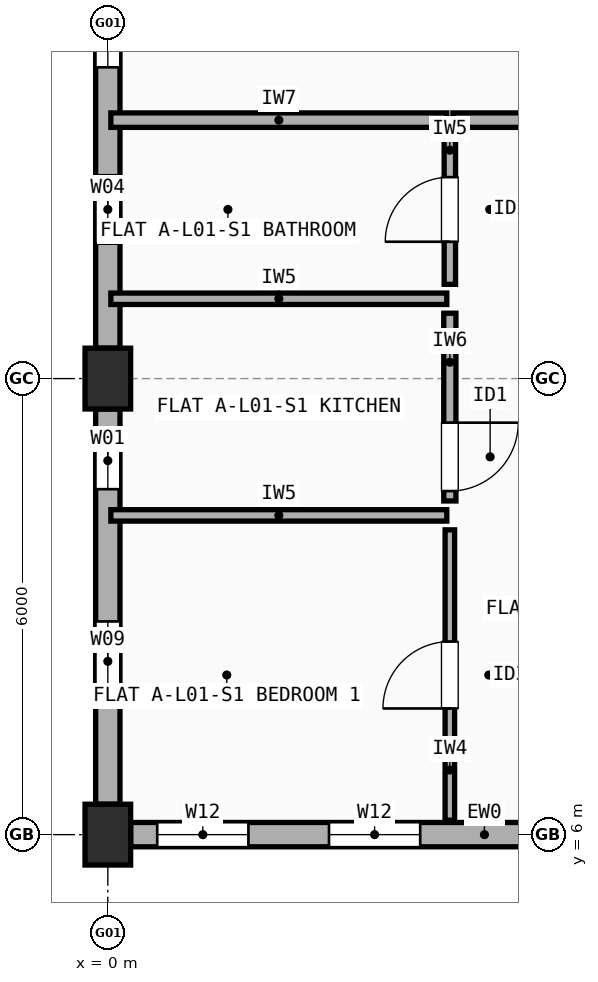
"""IFC4 building model, lengths in metres.
Left out: names, types, materials, properties, quantities, classifications, styles, units other than length and angle.
Written with IfcOpenShell. Run it as: python <this file> out.ifc"""

import sys

from ifc_helpers import new_model, si_unit, direction, frame, frame_2d, origin, origin_2d, place, context, subcontext, project, spatial, rectangle, extrude, element, fill, save


model = new_model("IFC4")
c1 = context("Model", 3, precision=1e-05, world=origin(), true_north=direction((0.0, 1.0)))
c2 = subcontext(c1, "Body", "Model", "MODEL_VIEW")
j1 = project(units=[si_unit("LENGTHUNIT", "METRE"), si_unit("PLANEANGLEUNIT", "RADIAN")], contexts=[c1])
p1 = place(None, origin())
s1 = spatial("IfcSite", under=j1, at=p1, CompositionType="ELEMENT")
p2 = place(p1, origin())
s2 = spatial("IfcBuilding", under=s1, at=p2, CompositionType="ELEMENT")
p3 = place(p2, frame((0.0, 0.0, 4.5)))
s3 = spatial("IfcBuildingStorey", under=s2, at=p3, CompositionType="ELEMENT", Elevation=4.5)
for number, where, z_axis, x_axis in (
    (1, (0.0, 6.0, 0.0), (0.0, 0.0, 1.0), (1.0, 0.0, 0.0)),
    (2, (0.0, 12.0, 0.0), (0.0, 0.0, 1.0), (1.0, 0.0, 0.0)),
):
    element("IfcColumn", number, at=place(p3, frame(where, z_axis=z_axis, x_axis=x_axis)), inside=s3, PredefinedType="COLUMN", context=c2, shape_type="SweptSolid", body=[
        extrude(rectangle(XDim=0.6, YDim=0.8, at=origin_2d()), origin(), (0.0, 0.0, 1.0), 2.945),
    ])
p4 = place(p3, frame((0.3, 6.0, 0.0), z_axis=(0.0, 0.0, 1.0), x_axis=(1.0, 0.0, 0.0)))
e3 = element("IfcWall", 3, at=p4, inside=s3, PredefinedType="STANDARD", context=c2, shape_type="SweptSolid", body=[
    extrude(rectangle(XDim=5.35, YDim=0.32, at=frame_2d((2.675, 0.0))), origin(), (0.0, 0.0, 1.0), 2.427),
])
p5 = place(p4, frame((0.35, 0.0, 0.9)))
e4 = element("IfcOpeningElement", 4, at=p5, cuts=e3, PredefinedType="OPENING", context=c2, shape_type="SweptSolid", body=[
    extrude(rectangle(XDim=1.2, YDim=1.35, at=frame_2d((0.6, 0.675))), frame((0.0, 0.17, 0.0), z_axis=(0.0, -1.0, 0.0), x_axis=(1.0, 0.0, 0.0)), (0.0, 0.0, 1.0), 0.34),
])
p6 = place(p4, frame((2.61, 0.0, 0.9)))
e5 = element("IfcOpeningElement", 5, at=p6, cuts=e3, PredefinedType="OPENING", context=c2, shape_type="SweptSolid", body=[
    extrude(rectangle(XDim=1.2, YDim=1.35, at=frame_2d((0.6, 0.675))), frame((0.0, 0.17, 0.0), z_axis=(0.0, -1.0, 0.0), x_axis=(1.0, 0.0, 0.0)), (0.0, 0.0, 1.0), 0.34),
])
p7 = place(p3, frame((0.0, 17.6, 0.0), z_axis=(0.0, 0.0, 1.0), x_axis=(0.0, -1.0, 0.0)))
e6 = element("IfcWall", 6, at=p7, inside=s3, PredefinedType="STANDARD", context=c2, shape_type="SweptSolid", body=[
    extrude(rectangle(XDim=5.2, YDim=0.32, at=frame_2d((2.6, 0.0))), origin(), (0.0, 0.0, 1.0), 2.427),
])
p8 = place(p7, frame((0.655, 0.0, 0.9)))
e7 = element("IfcOpeningElement", 7, at=p8, cuts=e6, PredefinedType="OPENING", context=c2, shape_type="SweptSolid", body=[
    extrude(rectangle(XDim=0.85, YDim=1.25, at=frame_2d((0.425, 0.625))), frame((0.0, 0.17, 0.0), z_axis=(0.0, -1.0, 0.0), x_axis=(1.0, 0.0, 0.0)), (0.0, 0.0, 1.0), 0.34),
])
p9 = place(p7, frame((2.925, 0.0, 0.9)))
e8 = element("IfcOpeningElement", 8, at=p9, cuts=e6, PredefinedType="OPENING", context=c2, shape_type="SweptSolid", body=[
    extrude(rectangle(XDim=0.9, YDim=1.3, at=frame_2d((0.45, 0.65))), frame((0.0, 0.17, 0.0), z_axis=(0.0, -1.0, 0.0), x_axis=(1.0, 0.0, 0.0)), (0.0, 0.0, 1.0), 0.34),
])
p10 = place(p3, frame((0.0, 11.6, 0.0), z_axis=(0.0, 0.0, 1.0), x_axis=(0.0, -1.0, 0.0)))
e9 = element("IfcWall", 9, at=p10, inside=s3, PredefinedType="STANDARD", context=c2, shape_type="SweptSolid", body=[
    extrude(rectangle(XDim=5.2, YDim=0.32, at=frame_2d((2.6, 0.0))), origin(), (0.0, 0.0, 1.0), 2.427),
])
p11 = place(p10, frame((0.305, 0.0, 0.9)))
e10 = element("IfcOpeningElement", 10, at=p11, cuts=e9, PredefinedType="OPENING", context=c2, shape_type="SweptSolid", body=[
    extrude(rectangle(XDim=0.75, YDim=1.15, at=frame_2d((0.375, 0.575))), frame((0.0, 0.17, 0.0), z_axis=(0.0, -1.0, 0.0), x_axis=(1.0, 0.0, 0.0)), (0.0, 0.0, 1.0), 0.34),
])
p12 = place(p10, frame((2.795, 0.0, 0.9)))
e11 = element("IfcOpeningElement", 11, at=p12, cuts=e9, PredefinedType="OPENING", context=c2, shape_type="SweptSolid", body=[
    extrude(rectangle(XDim=1.05, YDim=1.35, at=frame_2d((0.525, 0.675))), frame((0.0, 0.17, 0.0), z_axis=(0.0, -1.0, 0.0), x_axis=(1.0, 0.0, 0.0)), (0.0, 0.0, 1.0), 0.34),
])
p13 = place(p3, frame((0.04, 15.4, 0.0), z_axis=(0.0, 0.0, 1.0), x_axis=(1.0, 0.0, 0.0)))
e12 = element("IfcWall", 12, at=p13, inside=s3, PredefinedType="SOLIDWALL", context=c2, shape_type="SweptSolid", body=[
    extrude(rectangle(XDim=4.42, YDim=0.19, at=frame_2d((2.21, 0.0))), origin(), (0.0, 0.0, 1.0), 2.427),
])
p14 = place(p3, frame((4.54, 15.4, 0.0), z_axis=(0.0, 0.0, 1.0), x_axis=(1.0, 0.0, 0.0)))
e13 = element("IfcWall", 13, at=p14, inside=s3, PredefinedType="SOLIDWALL", context=c2, shape_type="SweptSolid", body=[
    extrude(rectangle(XDim=4.42, YDim=0.19, at=frame_2d((2.21, 0.0))), origin(), (0.0, 0.0, 1.0), 2.327),
])
p15 = place(p14, frame((1.72, 0.0, 0.0)))
e14 = element("IfcOpeningElement", 14, at=p15, cuts=e13, PredefinedType="OPENING", context=c2, shape_type="SweptSolid", body=[
    extrude(rectangle(XDim=0.98, YDim=2.15, at=frame_2d((0.49, 1.075))), frame((0.0, 0.105, 0.0), z_axis=(0.0, -1.0, 0.0), x_axis=(1.0, 0.0, 0.0)), (0.0, 0.0, 1.0), 0.21),
])
p16 = place(p3, frame((4.5, 6.19, 0.0), z_axis=(0.0, 0.0, 1.0), x_axis=(0.0, 1.0, 0.0)))
e15 = element("IfcWall", 15, at=p16, inside=s3, PredefinedType="PARTITIONING", context=c2, shape_type="SweptSolid", body=[
    extrude(rectangle(XDim=3.82, YDim=0.125, at=frame_2d((1.91, 0.0))), origin(), (0.0, 0.0, 1.0), 2.945),
])
p17 = place(p16, frame((1.47, 0.0, 0.0)))
e16 = element("IfcOpeningElement", 16, at=p17, cuts=e15, PredefinedType="OPENING", context=c2, shape_type="SweptSolid", body=[
    extrude(rectangle(XDim=0.88, YDim=2.1, at=frame_2d((0.44, 1.05))), frame((0.0, 0.073, 0.0), z_axis=(0.0, -1.0, 0.0), x_axis=(1.0, 0.0, 0.0)), (0.0, 0.0, 1.0), 0.145),
])
p18 = place(p3, frame((4.5, 10.39, 0.0), z_axis=(0.0, 0.0, 1.0), x_axis=(0.0, 1.0, 0.0)))
e17 = element("IfcWall", 17, at=p18, inside=s3, PredefinedType="PLUMBINGWALL", context=c2, shape_type="SweptSolid", body=[
    extrude(rectangle(XDim=2.47, YDim=0.16, at=frame_2d((1.235, 0.0))), origin(), (0.0, 0.0, 1.0), 2.377),
])
p19 = place(p18, frame((0.13, 0.0, 0.0)))
e18 = element("IfcOpeningElement", 18, at=p19, cuts=e17, PredefinedType="OPENING", context=c2, shape_type="SweptSolid", body=[
    extrude(rectangle(XDim=0.9, YDim=2.1, at=frame_2d((0.45, 1.05))), frame((0.0, 0.09, 0.0), z_axis=(0.0, -1.0, 0.0), x_axis=(1.0, 0.0, 0.0)), (0.0, 0.0, 1.0), 0.18),
])
p20 = place(p3, frame((4.5, 13.24, 0.0), z_axis=(0.0, 0.0, 1.0), x_axis=(0.0, 1.0, 0.0)))
e19 = element("IfcWall", 19, at=p20, inside=s3, PredefinedType="PARTITIONING", context=c2, shape_type="SweptSolid", body=[
    extrude(rectangle(XDim=1.97, YDim=0.15, at=frame_2d((0.985, 0.0))), origin(), (0.0, 0.0, 1.0), 2.945),
])
p21 = place(p20, frame((0.56, 0.0, 0.0)))
e20 = element("IfcOpeningElement", 20, at=p21, cuts=e19, PredefinedType="OPENING", context=c2, shape_type="SweptSolid", body=[
    extrude(rectangle(XDim=0.85, YDim=2.1, at=frame_2d((0.425, 1.05))), frame((0.0, 0.085, 0.0), z_axis=(0.0, -1.0, 0.0), x_axis=(1.0, 0.0, 0.0)), (0.0, 0.0, 1.0), 0.17),
])
for number, where, z_axis, x_axis in (
    (21, (0.04, 10.2, 0.0), (0.0, 0.0, 1.0), (1.0, 0.0, 0.0)),
    (22, (0.04, 13.05, 0.0), (0.0, 0.0, 1.0), (1.0, 0.0, 0.0)),
):
    element("IfcWall", number, at=place(p3, frame(where, z_axis=z_axis, x_axis=x_axis)), inside=s3, PredefinedType="PARTITIONING", context=c2, shape_type="SweptSolid", body=[
        extrude(rectangle(XDim=4.42, YDim=0.15, at=frame_2d((2.21, 0.0))), origin(), (0.0, 0.0, 1.0), 2.427),
    ])
p22 = place(p5, origin())
e23 = element("IfcWindow", 23, at=p22, inside=s3, PartitioningType="SINGLE_PANEL", PredefinedType="WINDOW", context=c2, shape_type="SweptSolid", body=[
    extrude(rectangle(XDim=1.2, YDim=1.35, at=frame_2d((0.6, 0.675))), frame((0.0, 0.03, 0.0), z_axis=(0.0, -1.0, 0.0), x_axis=(1.0, 0.0, 0.0)), (0.0, 0.0, 1.0), 0.06),
])
fill(e4, e23)
p23 = place(p6, origin())
e24 = element("IfcWindow", 24, at=p23, inside=s3, PartitioningType="SINGLE_PANEL", PredefinedType="WINDOW", context=c2, shape_type="SweptSolid", body=[
    extrude(rectangle(XDim=1.2, YDim=1.35, at=frame_2d((0.6, 0.675))), frame((0.0, 0.03, 0.0), z_axis=(0.0, -1.0, 0.0), x_axis=(1.0, 0.0, 0.0)), (0.0, 0.0, 1.0), 0.06),
])
fill(e5, e24)
p24 = place(p8, origin())
e25 = element("IfcWindow", 25, at=p24, inside=s3, PartitioningType="SINGLE_PANEL", PredefinedType="WINDOW", context=c2, shape_type="SweptSolid", body=[
    extrude(rectangle(XDim=0.85, YDim=1.25, at=frame_2d((0.425, 0.625))), frame((0.0, 0.03, 0.0), z_axis=(0.0, -1.0, 0.0), x_axis=(1.0, 0.0, 0.0)), (0.0, 0.0, 1.0), 0.06),
])
fill(e7, e25)
p25 = place(p9, origin())
e26 = element("IfcWindow", 26, at=p25, inside=s3, PartitioningType="SINGLE_PANEL", PredefinedType="WINDOW", context=c2, shape_type="SweptSolid", body=[
    extrude(rectangle(XDim=0.9, YDim=1.3, at=frame_2d((0.45, 0.65))), frame((0.0, 0.03, 0.0), z_axis=(0.0, -1.0, 0.0), x_axis=(1.0, 0.0, 0.0)), (0.0, 0.0, 1.0), 0.06),
])
fill(e8, e26)
p26 = place(p11, origin())
e27 = element("IfcWindow", 27, at=p26, inside=s3, PartitioningType="SINGLE_PANEL", PredefinedType="WINDOW", context=c2, shape_type="SweptSolid", body=[
    extrude(rectangle(XDim=0.75, YDim=1.15, at=frame_2d((0.375, 0.575))), frame((0.0, 0.03, 0.0), z_axis=(0.0, -1.0, 0.0), x_axis=(1.0, 0.0, 0.0)), (0.0, 0.0, 1.0), 0.06),
])
fill(e10, e27)
p27 = place(p12, origin())
e28 = element("IfcWindow", 28, at=p27, inside=s3, PartitioningType="SINGLE_PANEL", PredefinedType="WINDOW", context=c2, shape_type="SweptSolid", body=[
    extrude(rectangle(XDim=1.05, YDim=1.35, at=frame_2d((0.525, 0.675))), frame((0.0, 0.03, 0.0), z_axis=(0.0, -1.0, 0.0), x_axis=(1.0, 0.0, 0.0)), (0.0, 0.0, 1.0), 0.06),
])
fill(e11, e28)
p28 = place(p17, origin())
e29 = element("IfcDoor", 29, at=p28, inside=s3, OperationType="SINGLE_SWING_LEFT", PredefinedType="DOOR", context=c2, shape_type="SweptSolid", body=[
    extrude(rectangle(XDim=0.88, YDim=2.1, at=frame_2d((0.44, 1.05))), frame((0.0, 0.025, 0.0), z_axis=(0.0, -1.0, 0.0), x_axis=(1.0, 0.0, 0.0)), (0.0, 0.0, 1.0), 0.05),
])
fill(e16, e29)
p29 = place(p19, origin())
e30 = element("IfcDoor", 30, at=p29, inside=s3, OperationType="SINGLE_SWING_RIGHT", PredefinedType="DOOR", context=c2, shape_type="SweptSolid", body=[
    extrude(rectangle(XDim=0.9, YDim=2.1, at=frame_2d((0.45, 1.05))), frame((0.0, 0.025, 0.0), z_axis=(0.0, -1.0, 0.0), x_axis=(1.0, 0.0, 0.0)), (0.0, 0.0, 1.0), 0.05),
])
fill(e18, e30)
p30 = place(p21, origin())
e31 = element("IfcDoor", 31, at=p30, inside=s3, OperationType="SINGLE_SWING_LEFT", PredefinedType="DOOR", context=c2, shape_type="SweptSolid", body=[
    extrude(rectangle(XDim=0.85, YDim=2.1, at=frame_2d((0.425, 1.05))), frame((0.0, 0.025, 0.0), z_axis=(0.0, -1.0, 0.0), x_axis=(1.0, 0.0, 0.0)), (0.0, 0.0, 1.0), 0.05),
])
fill(e20, e31)
save(model, sys.argv[1])
